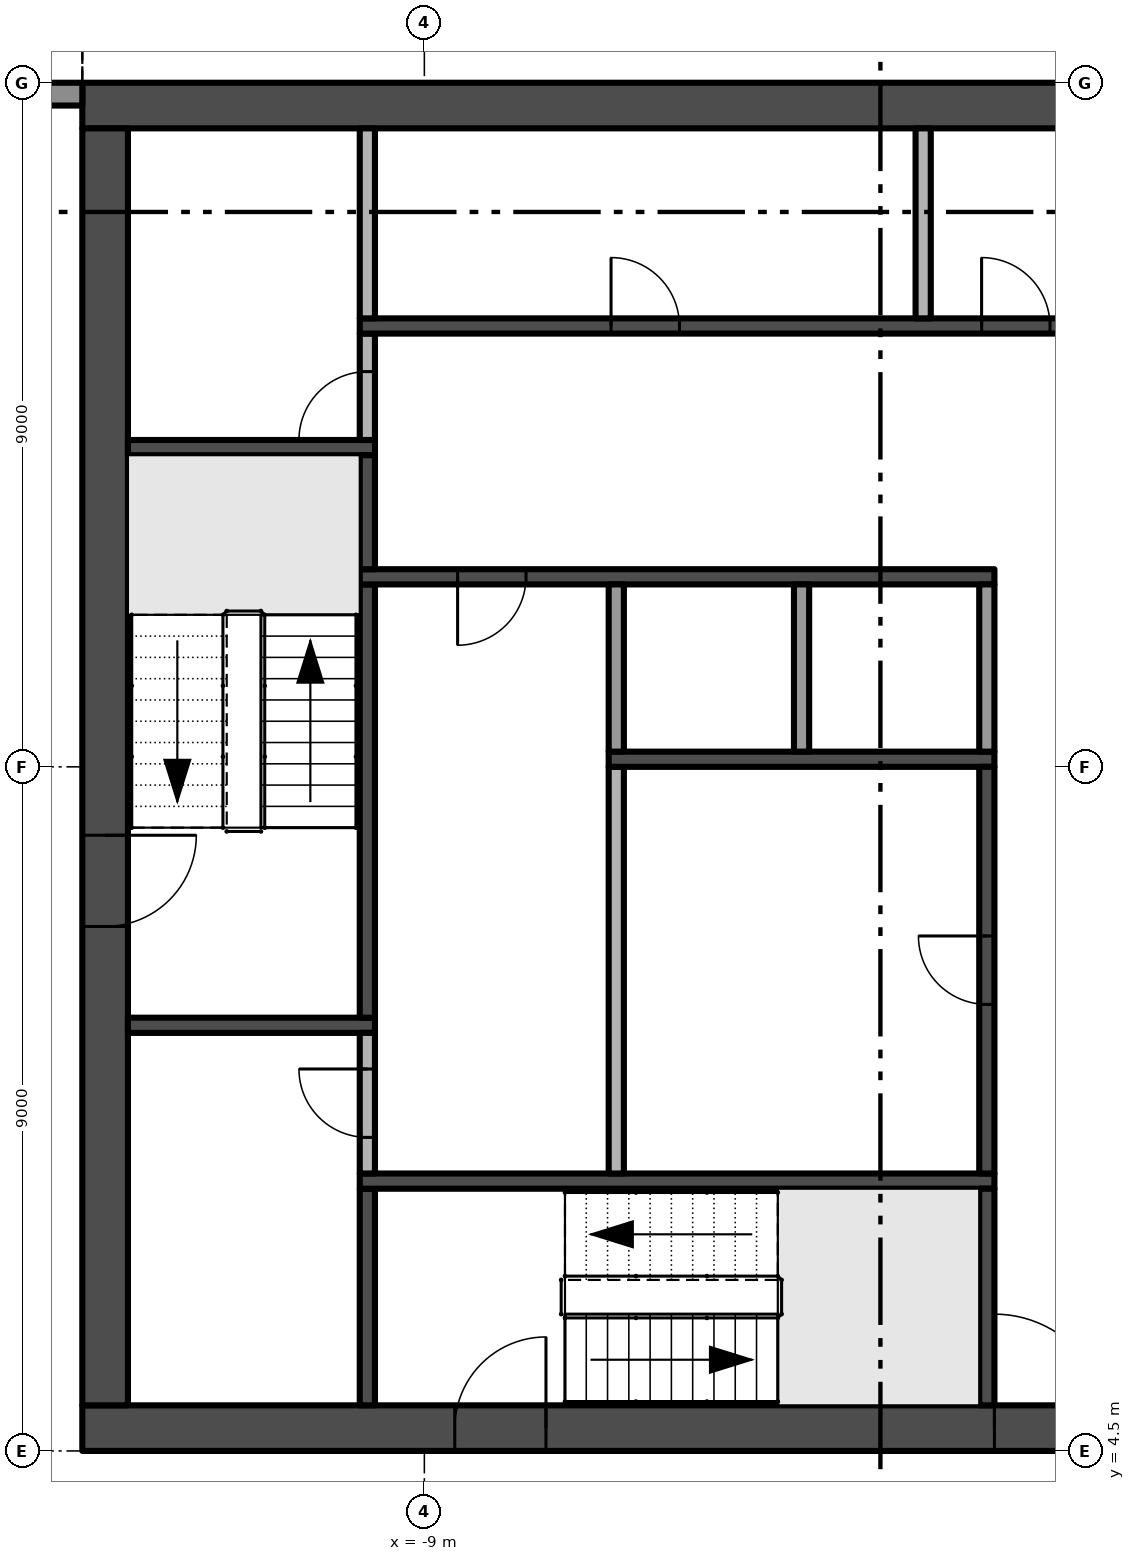
"""IFC4 building model, lengths in metres.
Left out: names, types, materials, properties, quantities, classifications, styles, units other than length and angle.
Written with IfcOpenShell. Run it as: python <this file> out.ifc"""

import sys

from ifc_helpers import new_model, si_unit, direction, frame, frame_2d, origin, place, context, subcontext, project, spatial, polyline, rectangle, outline, extrude, element, fill, save


model = new_model("IFC4")
c1 = context("Model", 3, precision=1e-05, world=origin(), true_north=direction((0.0, 1.0)))
c2 = subcontext(c1, "Body", "Model", "MODEL_VIEW")
j1 = project(units=[si_unit("LENGTHUNIT", "METRE"), si_unit("PLANEANGLEUNIT", "RADIAN")], contexts=[c1])
p1 = place(None, origin())
s1 = spatial("IfcSite", under=j1, at=p1, CompositionType="ELEMENT")
p2 = place(p1, origin())
s2 = spatial("IfcBuilding", under=s1, at=p2, CompositionType="ELEMENT")
p3 = place(p2, frame((0.0, 0.0, 188.2)))
s3 = spatial("IfcBuildingStorey", under=s2, at=p3, CompositionType="ELEMENT", Elevation=188.2)
p4 = place(p3, frame((-13.5, 4.8, -0.3), z_axis=(0.0, 0.0, 1.0), x_axis=(1.0, 0.0, 0.0)))
e1 = element("IfcWall", 1, at=p4, inside=s3, PredefinedType="SHEAR", context=c2, shape_type="SweptSolid", body=[
    extrude(rectangle(XDim=27.0, YDim=0.6, at=frame_2d((13.5, 0.0))), origin(), (0.0, 0.0, 1.0), 3.8),
])
p5 = place(p4, frame((12.0, 0.0, 0.3)))
e2 = element("IfcOpeningElement", 2, at=p5, cuts=e1, PredefinedType="OPENING", context=c2, shape_type="SweptSolid", body=[
    extrude(rectangle(XDim=3.0, YDim=2.4, at=frame_2d((1.5, 1.2))), frame((0.0, 0.31, 0.0), z_axis=(0.0, -1.0, 0.0), x_axis=(1.0, 0.0, 0.0)), (0.0, 0.0, 1.0), 0.62),
])
p6 = place(p4, frame((4.9, 0.0, 0.3)))
e3 = element("IfcOpeningElement", 3, at=p6, cuts=e1, PredefinedType="OPENING", context=c2, shape_type="SweptSolid", body=[
    extrude(rectangle(XDim=1.2, YDim=2.2, at=frame_2d((0.6, 1.1))), frame((0.0, 0.31, 0.0), z_axis=(0.0, -1.0, 0.0), x_axis=(1.0, 0.0, 0.0)), (0.0, 0.0, 1.0), 0.62),
])
p7 = place(p4, frame((20.75, 0.0, 0.3)))
e4 = element("IfcOpeningElement", 4, at=p7, cuts=e1, PredefinedType="OPENING", context=c2, shape_type="SweptSolid", body=[
    extrude(rectangle(XDim=1.5, YDim=2.2, at=frame_2d((0.75, 1.1))), frame((0.0, 0.31, 0.0), z_axis=(0.0, -1.0, 0.0), x_axis=(1.0, 0.0, 0.0)), (0.0, 0.0, 1.0), 0.62),
])
p8 = place(p4, frame((17.4, 0.0, 0.3)))
e5 = element("IfcOpeningElement", 5, at=p8, cuts=e1, PredefinedType="OPENING", context=c2, shape_type="SweptSolid", body=[
    extrude(rectangle(XDim=1.2, YDim=2.2, at=frame_2d((0.6, 1.1))), frame((0.0, 0.31, 0.0), z_axis=(0.0, -1.0, 0.0), x_axis=(1.0, 0.0, 0.0)), (0.0, 0.0, 1.0), 0.62),
])
p9 = place(p3, frame((13.5, 22.2, -0.3), z_axis=(0.0, 0.0, 1.0), x_axis=(-1.0, 0.0, 0.0)))
e6 = element("IfcWall", 6, at=p9, inside=s3, PredefinedType="SHEAR", context=c2, shape_type="SweptSolid", body=[
    extrude(rectangle(XDim=27.0, YDim=0.6, at=frame_2d((13.5, 0.0))), origin(), (0.0, 0.0, 1.0), 3.8),
])
p10 = place(p3, frame((-13.2, 21.9, -0.3), z_axis=(0.0, 0.0, 1.0), x_axis=(0.0, -1.0, 0.0)))
e7 = element("IfcWall", 7, at=p10, inside=s3, PredefinedType="SHEAR", context=c2, shape_type="SweptSolid", body=[
    extrude(rectangle(XDim=16.8, YDim=0.6, at=frame_2d((8.4, 0.0))), origin(), (0.0, 0.0, 1.0), 3.8),
])
p11 = place(p10, frame((9.3, 0.0, 0.3)))
e8 = element("IfcOpeningElement", 8, at=p11, cuts=e7, PredefinedType="OPENING", context=c2, shape_type="SweptSolid", body=[
    extrude(rectangle(XDim=1.2, YDim=2.2, at=frame_2d((0.6, 1.1))), frame((0.0, 0.31, 0.0), z_axis=(0.0, -1.0, 0.0), x_axis=(1.0, 0.0, 0.0)), (0.0, 0.0, 1.0), 0.62),
])
p12 = place(p3, frame((-17.475, 22.35, 0.0), z_axis=(0.0, 0.0, 1.0), x_axis=(1.0, 0.0, 0.0)))
e9 = element("IfcWall", 9, at=p12, inside=s3, PredefinedType="SOLIDWALL", context=c2, shape_type="SweptSolid", body=[
    extrude(rectangle(XDim=3.975, YDim=0.3, at=frame_2d((1.988, 0.0))), origin(), (0.0, 0.0, 1.0), 3.5),
])
p13 = place(p12, frame((0.325, 0.0, 0.0)))
e10 = element("IfcOpeningElement", 10, at=p13, cuts=e9, PredefinedType="OPENING", context=c2, shape_type="SweptSolid", body=[
    extrude(rectangle(XDim=3.025, YDim=2.4, at=frame_2d((1.512, 1.2))), frame((0.0, 0.16, 0.0), z_axis=(0.0, -1.0, 0.0), x_axis=(1.0, 0.0, 0.0)), (0.0, 0.0, 1.0), 0.32),
])
p14 = place(p3, origin())
e11 = element("IfcWall", 11, at=p14, inside=s3, PredefinedType="USERDEFINED", context=c2, shape_type="SweptSolid", body=[
    extrude(outline(polyline([(-13.5, 25.5), (-15.0, 25.271), (-16.5, 24.671), (-18.0, 23.929), (-19.5, 23.329), (-21.0, 23.1), (-22.5, 23.329), (-22.538, 23.082), (-21.0, 22.847), (-19.434, 23.086), (-17.898, 23.701), (-16.398, 24.442), (-14.934, 25.028), (-13.462, 25.253), (-13.5, 25.5)])), origin(), (0.0, 0.0, 1.0), 0.9),
])
for number, where, z_axis, x_axis in (
    (12, (-12.9, 10.1, 0.0), (0.0, 0.0, 1.0), (1.0, 0.0, 0.0)),
    (13, (-12.9, 17.7, 0.0), (0.0, 0.0, 1.0), (1.0, 0.0, 0.0)),
):
    element("IfcWall", number, at=place(p3, frame(where, z_axis=z_axis, x_axis=x_axis)), inside=s3, PredefinedType="SHEAR", context=c2, shape_type="SweptSolid", body=[
        extrude(rectangle(XDim=3.25, YDim=0.2, at=frame_2d((1.625, 0.0))), origin(), (0.0, 0.0, 1.0), 3.5),
    ])
p15 = place(p3, frame((-9.75, 5.1, 0.0), z_axis=(0.0, 0.0, 1.0), x_axis=(0.0, 1.0, 0.0)))
e14 = element("IfcWall", 14, at=p15, inside=s3, PredefinedType="SHEAR", context=c2, shape_type="SweptSolid", body=[
    extrude(rectangle(XDim=2.85, YDim=0.2, at=frame_2d((1.425, 0.0))), origin(), (0.0, 0.0, 1.0), 3.5),
])
p16 = place(p3, frame((-9.85, 8.05, 0.0), z_axis=(0.0, 0.0, 1.0), x_axis=(1.0, 0.0, 0.0)))
e15 = element("IfcWall", 15, at=p16, inside=s3, PredefinedType="SHEAR", context=c2, shape_type="SweptSolid", body=[
    extrude(rectangle(XDim=8.35, YDim=0.2, at=frame_2d((4.175, 0.0))), origin(), (0.0, 0.0, 1.0), 3.5),
])
p17 = place(p3, frame((-9.75, 8.15, 0.0), z_axis=(0.0, 0.0, 1.0), x_axis=(0.0, 1.0, 0.0)))
e16 = element("IfcWall", 16, at=p17, inside=s3, PredefinedType="PARTITIONING", context=c2, shape_type="SweptSolid", body=[
    extrude(rectangle(XDim=1.85, YDim=0.2, at=frame_2d((0.925, 0.0))), origin(), (0.0, 0.0, 1.0), 3.5),
])
p18 = place(p17, frame((0.475, 0.0, 0.0)))
e17 = element("IfcOpeningElement", 17, at=p18, cuts=e16, PredefinedType="OPENING", context=c2, shape_type="SweptSolid", body=[
    extrude(rectangle(XDim=0.9, YDim=2.1, at=frame_2d((0.45, 1.05))), frame((0.0, 0.11, 0.0), z_axis=(0.0, -1.0, 0.0), x_axis=(1.0, 0.0, 0.0)), (0.0, 0.0, 1.0), 0.22),
])
p19 = place(p3, frame((-9.75, 10.2, 0.0), z_axis=(0.0, 0.0, 1.0), x_axis=(0.0, 1.0, 0.0)))
e18 = element("IfcWall", 18, at=p19, inside=s3, PredefinedType="SHEAR", context=c2, shape_type="SweptSolid", body=[
    extrude(rectangle(XDim=5.7, YDim=0.2, at=frame_2d((2.85, 0.0))), origin(), (0.0, 0.0, 1.0), 3.5),
])
p20 = place(p3, frame((-1.5, 16.0, 0.0), z_axis=(0.0, 0.0, 1.0), x_axis=(-1.0, 0.0, 0.0)))
e19 = element("IfcWall", 19, at=p20, inside=s3, PredefinedType="SHEAR", context=c2, shape_type="SweptSolid", body=[
    extrude(rectangle(XDim=8.35, YDim=0.2, at=frame_2d((4.175, 0.0))), origin(), (0.0, 0.0, 1.0), 3.5),
])
p21 = place(p20, frame((6.162, 0.0, 0.0)))
e20 = element("IfcOpeningElement", 20, at=p21, cuts=e19, PredefinedType="OPENING", context=c2, shape_type="SweptSolid", body=[
    extrude(rectangle(XDim=0.9, YDim=2.1, at=frame_2d((0.45, 1.05))), frame((0.0, 0.11, 0.0), z_axis=(0.0, -1.0, 0.0), x_axis=(1.0, 0.0, 0.0)), (0.0, 0.0, 1.0), 0.22),
])
p22 = place(p3, frame((-9.75, 16.1, 0.0), z_axis=(0.0, 0.0, 1.0), x_axis=(0.0, 1.0, 0.0)))
e21 = element("IfcWall", 21, at=p22, inside=s3, PredefinedType="SHEAR", context=c2, shape_type="SweptSolid", body=[
    extrude(rectangle(XDim=1.5, YDim=0.2, at=frame_2d((0.75, 0.0))), origin(), (0.0, 0.0, 1.0), 3.5),
])
p23 = place(p3, frame((-9.75, 17.8, 0.0), z_axis=(0.0, 0.0, 1.0), x_axis=(0.0, 1.0, 0.0)))
e22 = element("IfcWall", 22, at=p23, inside=s3, PredefinedType="PARTITIONING", context=c2, shape_type="SweptSolid", body=[
    extrude(rectangle(XDim=1.4, YDim=0.2, at=frame_2d((0.7, 0.0))), origin(), (0.0, 0.0, 1.0), 3.5),
])
p24 = place(p23, origin())
e23 = element("IfcOpeningElement", 23, at=p24, cuts=e22, PredefinedType="OPENING", context=c2, shape_type="SweptSolid", body=[
    extrude(rectangle(XDim=0.9, YDim=2.1, at=frame_2d((0.45, 1.05))), frame((0.0, 0.11, 0.0), z_axis=(0.0, -1.0, 0.0), x_axis=(1.0, 0.0, 0.0)), (0.0, 0.0, 1.0), 0.22),
])
p25 = place(p3, frame((-9.85, 19.3, 0.0), z_axis=(0.0, 0.0, 1.0), x_axis=(1.0, 0.0, 0.0)))
e24 = element("IfcWall", 24, at=p25, inside=s3, PredefinedType="SHEAR", context=c2, shape_type="SweptSolid", body=[
    extrude(rectangle(XDim=19.7, YDim=0.2, at=frame_2d((9.85, 0.0))), origin(), (0.0, 0.0, 1.0), 3.5),
])
p26 = place(p25, frame((10.519, 0.0, 0.0)))
e25 = element("IfcOpeningElement", 25, at=p26, cuts=e24, PredefinedType="OPENING", context=c2, shape_type="SweptSolid", body=[
    extrude(rectangle(XDim=1.1, YDim=2.1, at=frame_2d((0.55, 1.05))), frame((0.0, 0.11, 0.0), z_axis=(0.0, -1.0, 0.0), x_axis=(1.0, 0.0, 0.0)), (0.0, 0.0, 1.0), 0.22),
])
p27 = place(p25, frame((12.956, 0.0, 0.0)))
e26 = element("IfcOpeningElement", 26, at=p27, cuts=e24, PredefinedType="OPENING", context=c2, shape_type="SweptSolid", body=[
    extrude(rectangle(XDim=1.1, YDim=2.1, at=frame_2d((0.55, 1.05))), frame((0.0, 0.11, 0.0), z_axis=(0.0, -1.0, 0.0), x_axis=(1.0, 0.0, 0.0)), (0.0, 0.0, 1.0), 0.22),
])
p28 = place(p25, frame((15.394, 0.0, 0.0)))
e27 = element("IfcOpeningElement", 27, at=p28, cuts=e24, PredefinedType="OPENING", context=c2, shape_type="SweptSolid", body=[
    extrude(rectangle(XDim=1.1, YDim=2.1, at=frame_2d((0.55, 1.05))), frame((0.0, 0.11, 0.0), z_axis=(0.0, -1.0, 0.0), x_axis=(1.0, 0.0, 0.0)), (0.0, 0.0, 1.0), 0.22),
])
p29 = place(p25, frame((17.831, 0.0, 0.0)))
e28 = element("IfcOpeningElement", 28, at=p29, cuts=e24, PredefinedType="OPENING", context=c2, shape_type="SweptSolid", body=[
    extrude(rectangle(XDim=1.1, YDim=2.1, at=frame_2d((0.55, 1.05))), frame((0.0, 0.11, 0.0), z_axis=(0.0, -1.0, 0.0), x_axis=(1.0, 0.0, 0.0)), (0.0, 0.0, 1.0), 0.22),
])
p30 = place(p25, frame((3.306, 0.0, 0.0)))
e29 = element("IfcOpeningElement", 29, at=p30, cuts=e24, PredefinedType="OPENING", context=c2, shape_type="SweptSolid", body=[
    extrude(rectangle(XDim=0.9, YDim=2.1, at=frame_2d((0.45, 1.05))), frame((0.0, 0.11, 0.0), z_axis=(0.0, -1.0, 0.0), x_axis=(1.0, 0.0, 0.0)), (0.0, 0.0, 1.0), 0.22),
])
p31 = place(p25, frame((8.181, 0.0, 0.0)))
e30 = element("IfcOpeningElement", 30, at=p31, cuts=e24, PredefinedType="OPENING", context=c2, shape_type="SweptSolid", body=[
    extrude(rectangle(XDim=0.9, YDim=2.1, at=frame_2d((0.45, 1.05))), frame((0.0, 0.11, 0.0), z_axis=(0.0, -1.0, 0.0), x_axis=(1.0, 0.0, 0.0)), (0.0, 0.0, 1.0), 0.22),
])
p32 = place(p3, frame((-9.75, 19.4, 0.0), z_axis=(0.0, 0.0, 1.0), x_axis=(0.0, 1.0, 0.0)))
e31 = element("IfcWall", 31, at=p32, inside=s3, PredefinedType="PARTITIONING", context=c2, shape_type="SweptSolid", body=[
    extrude(rectangle(XDim=2.5, YDim=0.2, at=frame_2d((1.25, 0.0))), origin(), (0.0, 0.0, 1.0), 3.5),
])
p33 = place(p3, frame((-6.475, 8.15, 0.0), z_axis=(0.0, 0.0, 1.0), x_axis=(0.0, 1.0, 0.0)))
e32 = element("IfcWall", 32, at=p33, inside=s3, PredefinedType="PARTITIONING", context=c2, shape_type="SweptSolid", body=[
    extrude(rectangle(XDim=5.35, YDim=0.2, at=frame_2d((2.675, 0.0))), origin(), (0.0, 0.0, 1.0), 3.5),
])
p34 = place(p3, frame((-6.575, 13.6, 0.0), z_axis=(0.0, 0.0, 1.0), x_axis=(1.0, 0.0, 0.0)))
e33 = element("IfcWall", 33, at=p34, inside=s3, PredefinedType="SHEAR", context=c2, shape_type="SweptSolid", body=[
    extrude(rectangle(XDim=5.075, YDim=0.2, at=frame_2d((2.538, 0.0))), origin(), (0.0, 0.0, 1.0), 3.5),
])
for number, where, z_axis, x_axis in (
    (34, (-6.475, 13.7, 0.0), (0.0, 0.0, 1.0), (0.0, 1.0, 0.0)),
    (35, (-4.037, 13.7, 0.0), (0.0, 0.0, 1.0), (0.0, 1.0, 0.0)),
):
    element("IfcWall", number, at=place(p3, frame(where, z_axis=z_axis, x_axis=x_axis)), inside=s3, PredefinedType="PARTITIONING", context=c2, shape_type="SweptSolid", body=[
        extrude(rectangle(XDim=2.2, YDim=0.2, at=frame_2d((1.1, 0.0))), origin(), (0.0, 0.0, 1.0), 3.5),
    ])
p35 = place(p3, frame((-2.438, 19.4, 0.0), z_axis=(0.0, 0.0, 1.0), x_axis=(0.0, 1.0, 0.0)))
e36 = element("IfcWall", 36, at=p35, inside=s3, PredefinedType="PARTITIONING", context=c2, shape_type="SweptSolid", body=[
    extrude(rectangle(XDim=2.5, YDim=0.2, at=frame_2d((1.25, 0.0))), origin(), (0.0, 0.0, 1.0), 3.5),
])
p36 = place(p3, frame((-1.6, 5.1, 0.0), z_axis=(0.0, 0.0, 1.0), x_axis=(0.0, 1.0, 0.0)))
e37 = element("IfcWall", 37, at=p36, inside=s3, PredefinedType="SHEAR", context=c2, shape_type="SweptSolid", body=[
    extrude(rectangle(XDim=2.85, YDim=0.2, at=frame_2d((1.425, 0.0))), origin(), (0.0, 0.0, 1.0), 3.5),
])
p37 = place(p3, frame((-1.6, 8.15, 0.0), z_axis=(0.0, 0.0, 1.0), x_axis=(0.0, 1.0, 0.0)))
e38 = element("IfcWall", 38, at=p37, inside=s3, PredefinedType="SHEAR", context=c2, shape_type="SweptSolid", body=[
    extrude(rectangle(XDim=5.35, YDim=0.2, at=frame_2d((2.675, 0.0))), origin(), (0.0, 0.0, 1.0), 3.5),
])
p38 = place(p37, frame((2.225, 0.0, 0.0)))
e39 = element("IfcOpeningElement", 39, at=p38, cuts=e38, PredefinedType="OPENING", context=c2, shape_type="SweptSolid", body=[
    extrude(rectangle(XDim=0.9, YDim=2.1, at=frame_2d((0.45, 1.05))), frame((0.0, 0.11, 0.0), z_axis=(0.0, -1.0, 0.0), x_axis=(1.0, 0.0, 0.0)), (0.0, 0.0, 1.0), 0.22),
])
p39 = place(p3, frame((-1.6, 13.7, 0.0), z_axis=(0.0, 0.0, 1.0), x_axis=(0.0, 1.0, 0.0)))
e40 = element("IfcWall", 40, at=p39, inside=s3, PredefinedType="PARTITIONING", context=c2, shape_type="SweptSolid", body=[
    extrude(rectangle(XDim=2.2, YDim=0.2, at=frame_2d((1.1, 0.0))), origin(), (0.0, 0.0, 1.0), 3.5),
])
p40 = place(p5, frame((3.0, 0.0, 0.0), z_axis=(0.0, 0.0, 1.0), x_axis=(-1.0, 0.0, 0.0)))
e41 = element("IfcDoor", 41, at=p40, inside=s3, OperationType="DOUBLE_DOOR_SINGLE_SWING", PredefinedType="DOOR", context=c2, shape_type="SweptSolid", body=[
    extrude(rectangle(XDim=3.0, YDim=2.4, at=frame_2d((1.5, 1.2))), frame((0.0, 0.025, 0.0), z_axis=(0.0, -1.0, 0.0), x_axis=(1.0, 0.0, 0.0)), (0.0, 0.0, 1.0), 0.05),
])
fill(e2, e41)
p41 = place(p11, frame((1.2, 0.0, 0.0), z_axis=(0.0, 0.0, 1.0), x_axis=(-1.0, 0.0, 0.0)))
e42 = element("IfcDoor", 42, at=p41, inside=s3, OperationType="SINGLE_SWING_RIGHT", PredefinedType="DOOR", context=c2, shape_type="SweptSolid", body=[
    extrude(rectangle(XDim=1.2, YDim=2.2, at=frame_2d((0.6, 1.1))), frame((0.0, 0.025, 0.0), z_axis=(0.0, -1.0, 0.0), x_axis=(1.0, 0.0, 0.0)), (0.0, 0.0, 1.0), 0.05),
])
fill(e8, e42)
p42 = place(p6, frame((1.2, 0.0, 0.0), z_axis=(0.0, 0.0, 1.0), x_axis=(-1.0, 0.0, 0.0)))
e43 = element("IfcDoor", 43, at=p42, inside=s3, OperationType="SINGLE_SWING_LEFT", PredefinedType="DOOR", context=c2, shape_type="SweptSolid", body=[
    extrude(rectangle(XDim=1.2, YDim=2.2, at=frame_2d((0.6, 1.1))), frame((0.0, 0.025, 0.0), z_axis=(0.0, -1.0, 0.0), x_axis=(1.0, 0.0, 0.0)), (0.0, 0.0, 1.0), 0.05),
])
fill(e3, e43)
p43 = place(p21, origin())
e44 = element("IfcDoor", 44, at=p43, inside=s3, OperationType="SINGLE_SWING_RIGHT", PredefinedType="DOOR", context=c2, shape_type="SweptSolid", body=[
    extrude(rectangle(XDim=0.9, YDim=2.1, at=frame_2d((0.45, 1.05))), frame((0.0, 0.025, 0.0), z_axis=(0.0, -1.0, 0.0), x_axis=(1.0, 0.0, 0.0)), (0.0, 0.0, 1.0), 0.05),
])
fill(e20, e44)
p44 = place(p38, origin())
e45 = element("IfcDoor", 45, at=p44, inside=s3, OperationType="SINGLE_SWING_RIGHT", PredefinedType="DOOR", context=c2, shape_type="SweptSolid", body=[
    extrude(rectangle(XDim=0.9, YDim=2.1, at=frame_2d((0.45, 1.05))), frame((0.0, 0.025, 0.0), z_axis=(0.0, -1.0, 0.0), x_axis=(1.0, 0.0, 0.0)), (0.0, 0.0, 1.0), 0.05),
])
fill(e39, e45)
p45 = place(p24, origin())
e46 = element("IfcDoor", 46, at=p45, inside=s3, OperationType="SINGLE_SWING_LEFT", PredefinedType="DOOR", context=c2, shape_type="SweptSolid", body=[
    extrude(rectangle(XDim=0.9, YDim=2.1, at=frame_2d((0.45, 1.05))), frame((0.0, 0.025, 0.0), z_axis=(0.0, -1.0, 0.0), x_axis=(1.0, 0.0, 0.0)), (0.0, 0.0, 1.0), 0.05),
])
fill(e23, e46)
p46 = place(p30, origin())
e47 = element("IfcDoor", 47, at=p46, inside=s3, OperationType="SINGLE_SWING_LEFT", PredefinedType="DOOR", context=c2, shape_type="SweptSolid", body=[
    extrude(rectangle(XDim=0.9, YDim=2.1, at=frame_2d((0.45, 1.05))), frame((0.0, 0.025, 0.0), z_axis=(0.0, -1.0, 0.0), x_axis=(1.0, 0.0, 0.0)), (0.0, 0.0, 1.0), 0.05),
])
fill(e29, e47)
p47 = place(p31, origin())
e48 = element("IfcDoor", 48, at=p47, inside=s3, OperationType="SINGLE_SWING_LEFT", PredefinedType="DOOR", context=c2, shape_type="SweptSolid", body=[
    extrude(rectangle(XDim=0.9, YDim=2.1, at=frame_2d((0.45, 1.05))), frame((0.0, 0.025, 0.0), z_axis=(0.0, -1.0, 0.0), x_axis=(1.0, 0.0, 0.0)), (0.0, 0.0, 1.0), 0.05),
])
fill(e30, e48)
p48 = place(p18, origin())
e49 = element("IfcDoor", 49, at=p48, inside=s3, OperationType="SINGLE_SWING_RIGHT", PredefinedType="DOOR", context=c2, shape_type="SweptSolid", body=[
    extrude(rectangle(XDim=0.9, YDim=2.1, at=frame_2d((0.45, 1.05))), frame((0.0, 0.025, 0.0), z_axis=(0.0, -1.0, 0.0), x_axis=(1.0, 0.0, 0.0)), (0.0, 0.0, 1.0), 0.05),
])
fill(e17, e49)
save(model, sys.argv[1])
